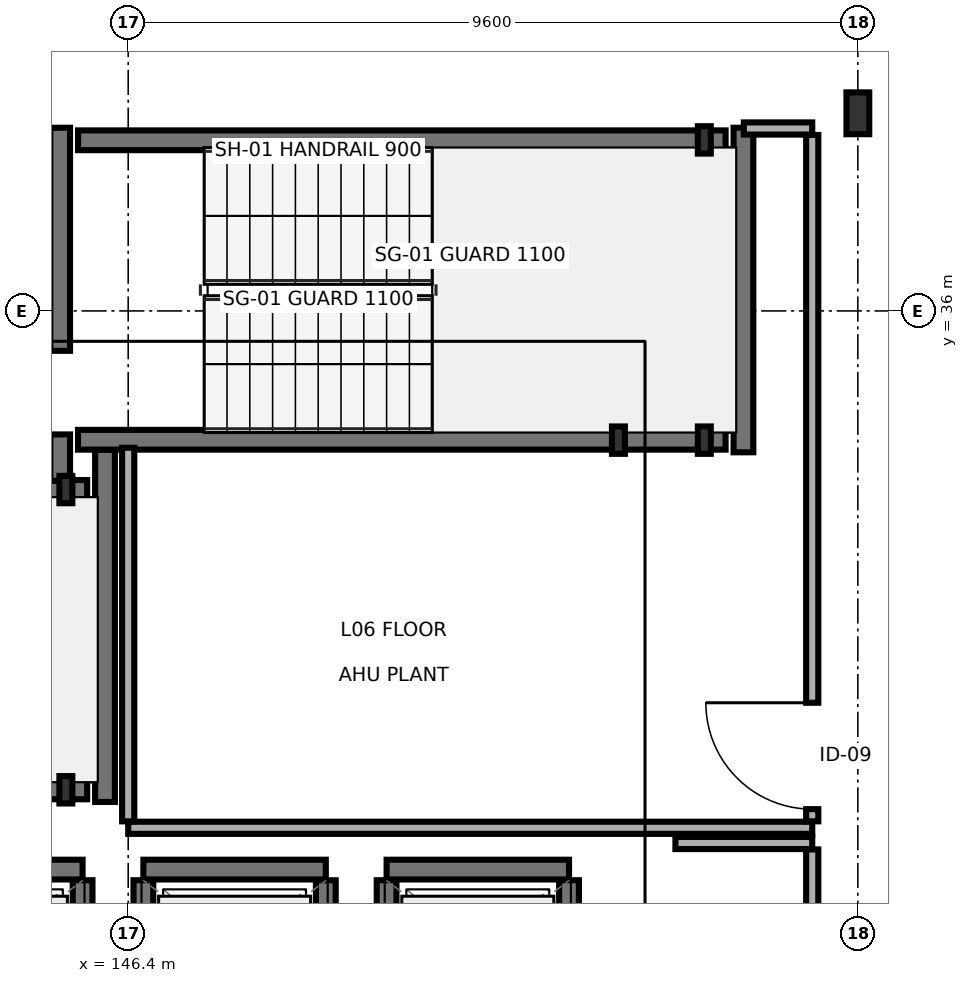
"""IFC4 building model, lengths in metres.
Left out: names, types, materials, properties, quantities, classifications, styles, units other than length and angle.
Written with IfcOpenShell. Run it as: python <this file> out.ifc"""

import sys

from ifc_helpers import new_model, si_unit, direction, frame, frame_2d, origin, origin_2d, place, context, subcontext, project, spatial, rectangle, i_section, extrude, element, fill, save


model = new_model("IFC4")
c1 = context("Model", 3, precision=1e-05, world=origin(), true_north=direction((0.0, 1.0)))
c2 = subcontext(c1, "Body", "Model", "MODEL_VIEW")
j1 = project(units=[si_unit("LENGTHUNIT", "METRE"), si_unit("PLANEANGLEUNIT", "RADIAN")], contexts=[c1])
p1 = place(None, origin())
s1 = spatial("IfcSite", under=j1, at=p1, CompositionType="ELEMENT")
p2 = place(p1, origin())
s2 = spatial("IfcBuilding", under=s1, at=p2, CompositionType="ELEMENT")
p3 = place(p2, frame((0.0, 0.0, 21.5)))
s3 = spatial("IfcBuildingStorey", under=s2, at=p3, CompositionType="ELEMENT", Elevation=21.5)
for number, where, z_axis, x_axis in (
    (1, (145.58, 29.7, 0.0), (0.0, 0.0, 1.0), (1.0, 0.0, 0.0)),
    (2, (145.58, 33.65, 0.0), (0.0, 0.0, 1.0), (1.0, 0.0, 0.0)),
    (3, (152.85, 34.3, 0.0), (0.0, 0.0, 1.0), (1.0, 0.0, 0.0)),
    (4, (153.98, 34.3, 0.0), (0.0, 0.0, 1.0), (1.0, 0.0, 0.0)),
    (5, (153.98, 38.25, 0.0), (0.0, 0.0, 1.0), (1.0, 0.0, 0.0)),
):
    element("IfcColumn", number, at=place(p3, frame(where, z_axis=z_axis, x_axis=x_axis)), inside=s3, PredefinedType="PILASTER", context=c2, shape_type="SweptSolid", body=[
        extrude(i_section(OverallWidth=0.17, OverallDepth=0.36, WebThickness=0.008, FlangeThickness=0.013, FilletRadius=0.018, at=origin_2d()), origin(), (0.0, 0.0, 1.0), 3.4),
    ])
p4 = place(p3, frame((156.0, 38.6, 0.0), z_axis=(0.0, 0.0, 1.0), x_axis=(1.0, 0.0, 0.0)))
e6 = element("IfcColumn", 6, at=p4, inside=s3, PredefinedType="COLUMN", context=c2, shape_type="SweptSolid", body=[
    extrude(i_section(OverallWidth=0.3, OverallDepth=0.55, WebThickness=0.015, FlangeThickness=0.029, FilletRadius=0.027, at=origin_2d()), origin(), (0.0, 0.0, 1.0), 3.4),
])
p5 = place(p3, frame((146.095, 29.54, 0.0), z_axis=(0.0, 0.0, 1.0), x_axis=(0.0, 1.0, 0.0)))
e7 = element("IfcWall", 7, at=p5, inside=s3, PredefinedType="SHEAR", context=c2, shape_type="SweptSolid", body=[
    extrude(rectangle(XDim=4.635, YDim=0.26, at=frame_2d((2.317, 0.0))), origin(), (0.0, 0.0, 1.0), 3.195),
])
for number, where, z_axis, x_axis in (
    (8, (137.34, 29.705, 0.0), (0.0, 0.0, 1.0), (1.0, 0.0, 0.0)),
    (9, (137.34, 33.645, 0.0), (0.0, 0.0, 1.0), (1.0, 0.0, 0.0)),
):
    element("IfcWall", number, at=place(p3, frame(where, z_axis=z_axis, x_axis=x_axis)), inside=s3, PredefinedType="SHEAR", context=c2, shape_type="SweptSolid", body=[
        extrude(rectangle(XDim=8.52, YDim=0.26, at=frame_2d((4.26, 0.0))), origin(), (0.0, 0.0, 1.0), 3.195),
    ])
p6 = place(p3, frame((145.505, 33.765, 0.0), z_axis=(0.0, 0.0, 1.0), x_axis=(0.0, 1.0, 0.0)))
e10 = element("IfcWall", 10, at=p6, inside=s3, PredefinedType="SHEAR", context=c2, shape_type="SweptSolid", body=[
    extrude(rectangle(XDim=4.645, YDim=0.26, at=frame_2d((2.323, 0.0))), origin(), (0.0, 0.0, 1.0), 3.195),
])
p7 = place(p6, frame((0.61, 0.0, 0.0)))
e11 = element("IfcOpeningElement", 11, at=p7, cuts=e10, PredefinedType="OPENING", context=c2, shape_type="SweptSolid", body=[
    extrude(rectangle(XDim=1.1, YDim=2.2, at=frame_2d((0.55, 1.1))), frame((0.0, 0.14, 0.0), z_axis=(0.0, -1.0, 0.0), x_axis=(1.0, 0.0, 0.0)), (0.0, 0.0, 1.0), 0.28),
])
p8 = place(p3, frame((154.495, 34.14, 0.0), z_axis=(0.0, 0.0, 1.0), x_axis=(0.0, 1.0, 0.0)))
e12 = element("IfcWall", 12, at=p8, inside=s3, PredefinedType="SHEAR", context=c2, shape_type="SweptSolid", body=[
    extrude(rectangle(XDim=4.27, YDim=0.26, at=frame_2d((2.135, 0.0))), origin(), (0.0, 0.0, 1.0), 3.195),
])
for number, where, z_axis, x_axis in (
    (13, (145.74, 34.305, 0.0), (0.0, 0.0, 1.0), (1.0, 0.0, 0.0)),
    (14, (145.74, 38.245, 0.0), (0.0, 0.0, 1.0), (1.0, 0.0, 0.0)),
):
    element("IfcWall", number, at=place(p3, frame(where, z_axis=z_axis, x_axis=x_axis)), inside=s3, PredefinedType="SHEAR", context=c2, shape_type="SweptSolid", body=[
        extrude(rectangle(XDim=8.52, YDim=0.26, at=frame_2d((4.26, 0.0))), origin(), (0.0, 0.0, 1.0), 3.195),
    ])
p9 = place(p3, frame((143.4, 28.65, 0.0), z_axis=(0.0, 0.0, 1.0), x_axis=(1.0, 0.0, 0.0)))
e15 = element("IfcWall", 15, at=p9, inside=s3, PredefinedType="SHEAR", context=c2, shape_type="SweptSolid", body=[
    extrude(rectangle(XDim=2.4, YDim=0.26, at=frame_2d((1.2, 0.0))), origin(), (0.0, 0.0, 1.0), 3.195),
])
p10 = place(p3, frame((145.8, 26.69, 0.0), z_axis=(0.0, 0.0, 1.0), x_axis=(0.0, 1.0, 0.0)))
e16 = element("IfcWall", 16, at=p10, inside=s3, PredefinedType="SHEAR", context=c2, shape_type="SweptSolid", body=[
    extrude(rectangle(XDim=1.82, YDim=0.26, at=frame_2d((0.91, 0.0))), origin(), (0.0, 0.0, 1.0), 3.195),
])
p11 = place(p3, frame((146.6, 28.65, 0.0), z_axis=(0.0, 0.0, 1.0), x_axis=(1.0, 0.0, 0.0)))
e17 = element("IfcWall", 17, at=p11, inside=s3, PredefinedType="SHEAR", context=c2, shape_type="SweptSolid", body=[
    extrude(rectangle(XDim=2.4, YDim=0.26, at=frame_2d((1.2, 0.0))), origin(), (0.0, 0.0, 1.0), 3.195),
])
for number, where, z_axis, x_axis in (
    (18, (146.6, 26.69, 0.0), (0.0, 0.0, 1.0), (0.0, 1.0, 0.0)),
    (19, (149.0, 26.69, 0.0), (0.0, 0.0, 1.0), (0.0, 1.0, 0.0)),
):
    element("IfcWall", number, at=place(p3, frame(where, z_axis=z_axis, x_axis=x_axis)), inside=s3, PredefinedType="SHEAR", context=c2, shape_type="SweptSolid", body=[
        extrude(rectangle(XDim=1.82, YDim=0.26, at=frame_2d((0.91, 0.0))), origin(), (0.0, 0.0, 1.0), 3.195),
    ])
p12 = place(p3, frame((149.8, 28.65, 0.0), z_axis=(0.0, 0.0, 1.0), x_axis=(1.0, 0.0, 0.0)))
e20 = element("IfcWall", 20, at=p12, inside=s3, PredefinedType="SHEAR", context=c2, shape_type="SweptSolid", body=[
    extrude(rectangle(XDim=2.4, YDim=0.26, at=frame_2d((1.2, 0.0))), origin(), (0.0, 0.0, 1.0), 3.195),
])
for number, where, z_axis, x_axis in (
    (21, (149.8, 26.69, 0.0), (0.0, 0.0, 1.0), (0.0, 1.0, 0.0)),
    (22, (152.2, 26.69, 0.0), (0.0, 0.0, 1.0), (0.0, 1.0, 0.0)),
):
    element("IfcWall", number, at=place(p3, frame(where, z_axis=z_axis, x_axis=x_axis)), inside=s3, PredefinedType="SHEAR", context=c2, shape_type="SweptSolid", body=[
        extrude(rectangle(XDim=1.82, YDim=0.26, at=frame_2d((0.91, 0.0))), origin(), (0.0, 0.0, 1.0), 3.195),
    ])
p13 = place(p3, frame((146.4, 29.2, 0.0), z_axis=(0.0, 0.0, 1.0), x_axis=(1.0, 0.0, 0.0)))
e23 = element("IfcWall", 23, at=p13, inside=s3, PredefinedType="PARTITIONING", context=c2, shape_type="SweptSolid", body=[
    extrude(rectangle(XDim=9.0, YDim=0.16, at=frame_2d((4.5, 0.0))), origin(), (0.0, 0.0, 1.0), 3.195),
])
p14 = place(p3, frame((146.4, 29.285, 0.0), z_axis=(0.0, 0.0, 1.0), x_axis=(0.0, 1.0, 0.0)))
e24 = element("IfcWall", 24, at=p14, inside=s3, PredefinedType="PARTITIONING", context=c2, shape_type="SweptSolid", body=[
    extrude(rectangle(XDim=4.915, YDim=0.16, at=frame_2d((2.458, 0.0))), origin(), (0.0, 0.0, 1.0), 3.195),
])
p15 = place(p3, frame((154.5, 38.4, 0.0), z_axis=(0.0, 0.0, 1.0), x_axis=(1.0, 0.0, 0.0)))
e25 = element("IfcWall", 25, at=p15, inside=s3, PredefinedType="PARTITIONING", context=c2, shape_type="SweptSolid", body=[
    extrude(rectangle(XDim=0.9, YDim=0.16, at=frame_2d((0.45, 0.0))), origin(), (0.0, 0.0, 1.0), 2.73),
])
p16 = place(p3, frame((155.4, 29.285, 0.0), z_axis=(0.0, 0.0, 1.0), x_axis=(0.0, 1.0, 0.0)))
e26 = element("IfcWall", 26, at=p16, inside=s3, PredefinedType="PARTITIONING", context=c2, shape_type="SweptSolid", body=[
    extrude(rectangle(XDim=9.03, YDim=0.16, at=frame_2d((4.515, 0.0))), origin(), (0.0, 0.0, 1.0), 3.195),
])
p17 = place(p16, frame((0.16, 0.0, 0.0)))
e27 = element("IfcOpeningElement", 27, at=p17, cuts=e26, PredefinedType="OPENING", context=c2, shape_type="SweptSolid", body=[
    extrude(rectangle(XDim=1.4, YDim=2.2, at=frame_2d((0.7, 1.1))), frame((0.0, 0.09, 0.0), z_axis=(0.0, -1.0, 0.0), x_axis=(1.0, 0.0, 0.0)), (0.0, 0.0, 1.0), 0.18),
])
p18 = place(p3, frame((153.6, 29.0, 0.0), z_axis=(0.0, 0.0, 1.0), x_axis=(1.0, 0.0, 0.0)))
e28 = element("IfcWall", 28, at=p18, inside=s3, PredefinedType="PARTITIONING", context=c2, shape_type="SweptSolid", body=[
    extrude(rectangle(XDim=1.8, YDim=0.16, at=frame_2d((0.9, 0.0))), origin(), (0.0, 0.0, 1.0), 3.195),
])
p19 = place(p3, frame((155.4, 16.885, 0.0), z_axis=(0.0, 0.0, 1.0), x_axis=(0.0, 1.0, 0.0)))
e29 = element("IfcWall", 29, at=p19, inside=s3, PredefinedType="PARTITIONING", context=c2, shape_type="SweptSolid", body=[
    extrude(rectangle(XDim=12.03, YDim=0.16, at=frame_2d((6.015, 0.0))), origin(), (0.0, 0.0, 1.0), 2.73),
])
p20 = place(p19, frame((5.365, 0.0, 0.0)))
e30 = element("IfcOpeningElement", 30, at=p20, cuts=e29, PredefinedType="OPENING", context=c2, shape_type="SweptSolid", body=[
    extrude(rectangle(XDim=1.3, YDim=2.2, at=frame_2d((0.65, 1.1))), frame((0.0, 0.09, 0.0), z_axis=(0.0, -1.0, 0.0), x_axis=(1.0, 0.0, 0.0)), (0.0, 0.0, 1.0), 0.18),
])
p21 = place(p7, origin())
e31 = element("IfcDoor", 31, at=p21, inside=s3, OperationType="SINGLE_SWING_LEFT", PredefinedType="DOOR", context=c2, shape_type="SweptSolid", body=[
    extrude(rectangle(XDim=1.1, YDim=2.2, at=frame_2d((0.55, 1.1))), frame((0.0, 0.025, 0.0), z_axis=(0.0, -1.0, 0.0), x_axis=(1.0, 0.0, 0.0)), (0.0, 0.0, 1.0), 0.05),
])
fill(e11, e31)
p22 = place(p17, origin())
e32 = element("IfcDoor", 32, at=p22, inside=s3, OperationType="SINGLE_SWING_RIGHT", PredefinedType="DOOR", context=c2, shape_type="SweptSolid", body=[
    extrude(rectangle(XDim=1.4, YDim=2.2, at=frame_2d((0.7, 1.1))), frame((0.0, 0.025, 0.0), z_axis=(0.0, -1.0, 0.0), x_axis=(1.0, 0.0, 0.0)), (0.0, 0.0, 1.0), 0.05),
])
fill(e27, e32)
save(model, sys.argv[1])
